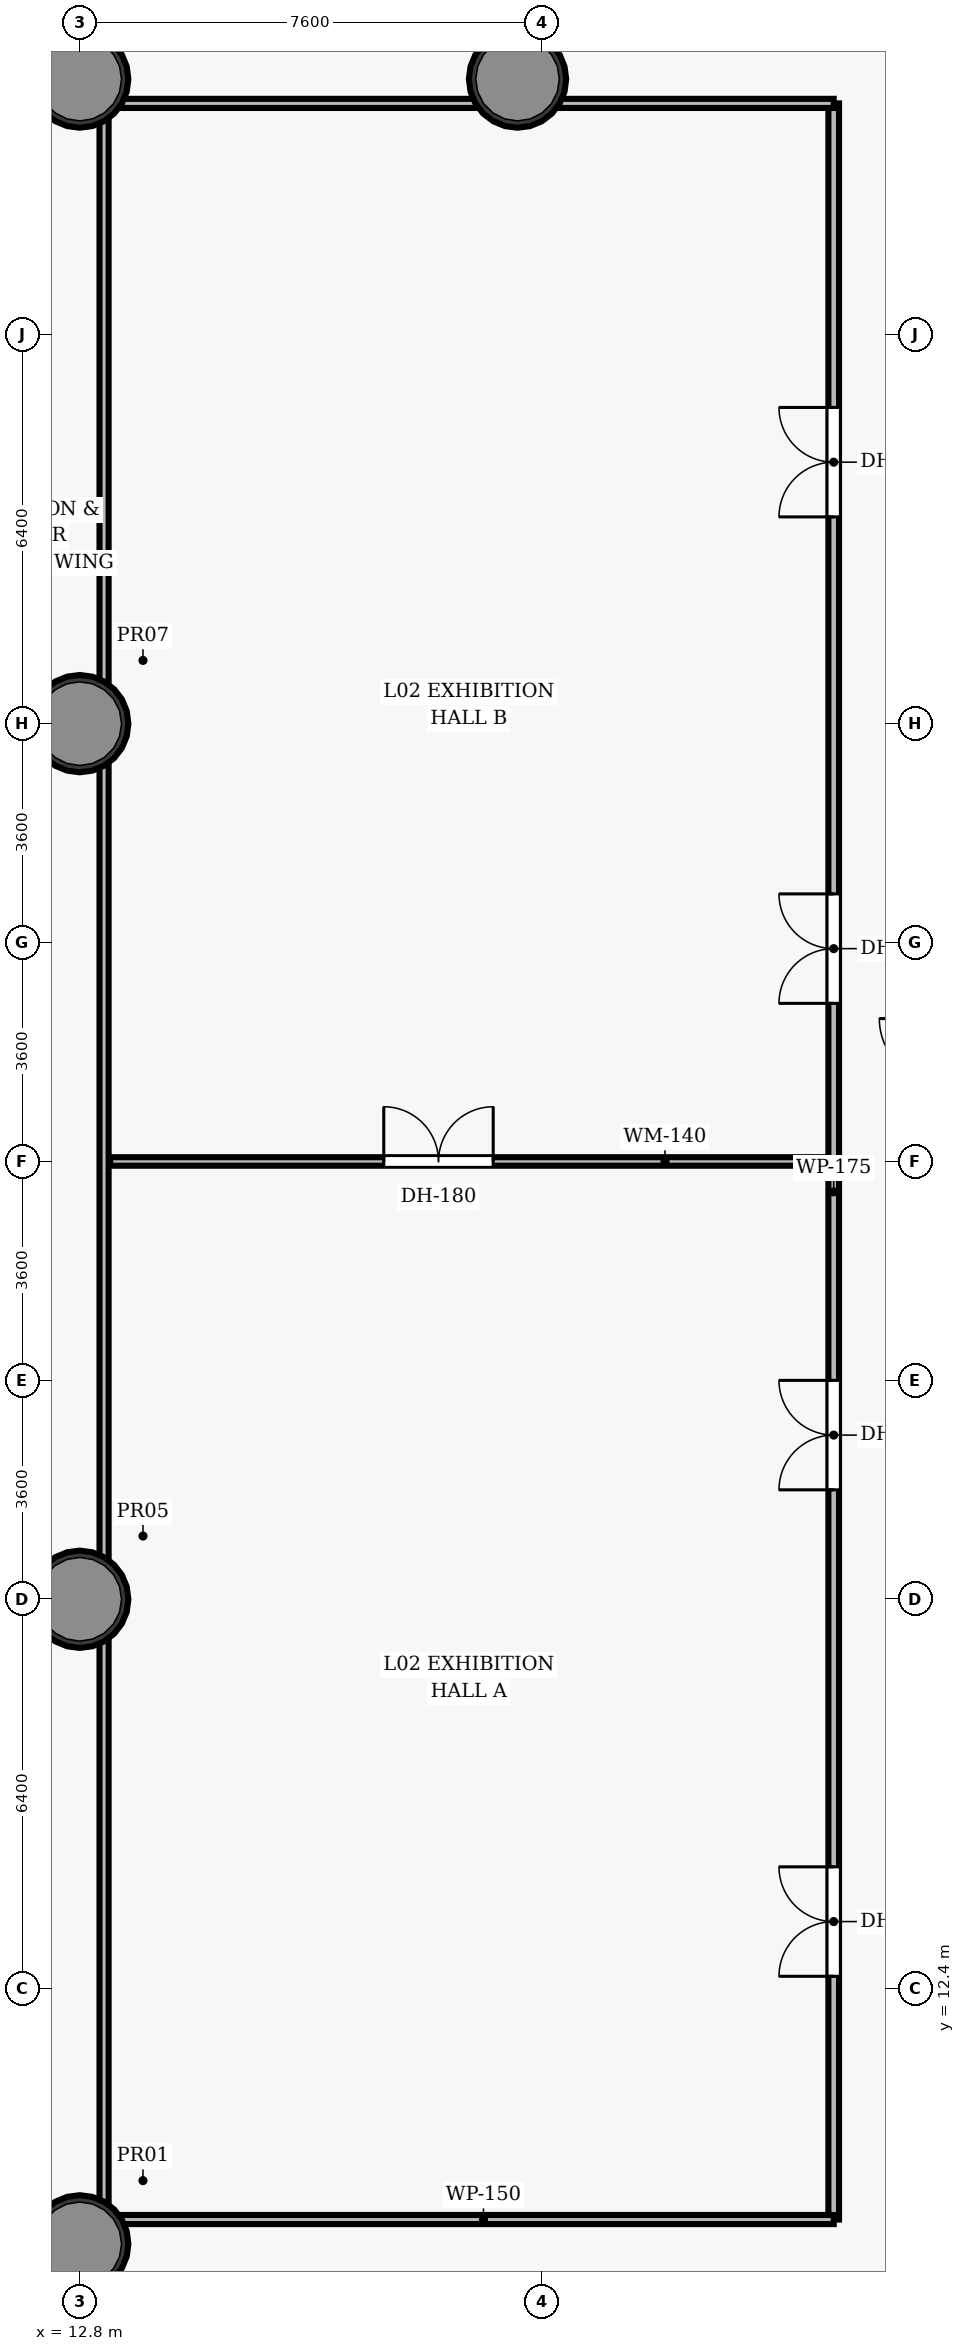
"""IFC4 building model, lengths in metres.
Left out: names, types, materials, properties, quantities, classifications, styles, units other than length and angle.
Written with IfcOpenShell. Run it as: python <this file> out.ifc"""

import sys

from ifc_helpers import new_model, si_unit, direction, frame, frame_2d, origin, origin_2d, place, context, subcontext, project, spatial, rectangle, hollow_circle, extrude, element, fill, save


model = new_model("IFC4")
c1 = context("Model", 3, precision=1e-05, world=origin(), true_north=direction((0.0, 1.0)))
c2 = subcontext(c1, "Body", "Model", "MODEL_VIEW")
j1 = project(units=[si_unit("LENGTHUNIT", "METRE"), si_unit("PLANEANGLEUNIT", "RADIAN")], contexts=[c1])
p1 = place(None, origin())
s1 = spatial("IfcSite", under=j1, at=p1, CompositionType="ELEMENT")
p2 = place(p1, origin())
s2 = spatial("IfcBuilding", under=s1, at=p2, CompositionType="ELEMENT")
p3 = place(p2, frame((0.0, 0.0, 12.0)))
s3 = spatial("IfcBuildingStorey", under=s2, at=p3, CompositionType="ELEMENT", Elevation=12.0)
for number, where, z_axis, x_axis in (
    (1, (12.8, 8.2, 0.0), (0.0, 0.0, 1.0), (1.0, 0.0, 0.0)),
    (2, (12.8, 18.8, 0.0), (0.0, 0.0, 1.0), (1.0, 0.0, 0.0)),
    (3, (12.8, 33.2, 0.0), (0.0, 0.0, 1.0), (1.0, 0.0, 0.0)),
    (4, (12.8, 43.8, 0.0), (0.0, 0.0, 1.0), (1.0, 0.0, 0.0)),
    (5, (20.0, 43.8, 0.0), (0.0, 0.0, 1.0), (1.0, 0.0, 0.0)),
):
    element("IfcColumn", number, at=place(p3, frame(where, z_axis=z_axis, x_axis=x_axis)), inside=s3, PredefinedType="COLUMN", context=c2, shape_type="SweptSolid", body=[
        extrude(hollow_circle(Radius=0.8, WallThickness=0.06, at=origin_2d()), origin(), (0.0, 0.0, 1.0), 6.6),
    ])
p4 = place(p3, frame((25.2, 8.6, 0.0), z_axis=(0.0, 0.0, 1.0), x_axis=(0.0, 1.0, 0.0)))
e6 = element("IfcWall", 6, at=p4, inside=s3, PredefinedType="PARTITIONING", context=c2, shape_type="SweptSolid", body=[
    extrude(rectangle(XDim=34.8, YDim=0.175, at=frame_2d((17.4, 0.0))), origin(), (0.0, 0.0, 1.0), 5.31),
])
p5 = place(p4, frame((4.0, 0.0, 0.0)))
e7 = element("IfcOpeningElement", 7, at=p5, cuts=e6, PredefinedType="OPENING", context=c2, shape_type="SweptSolid", body=[
    extrude(rectangle(XDim=1.8, YDim=2.35, at=frame_2d((0.9, 1.175))), frame((0.0, 0.097, 0.0), z_axis=(0.0, -1.0, 0.0), x_axis=(1.0, 0.0, 0.0)), (0.0, 0.0, 1.0), 0.195),
])
p6 = place(p4, frame((12.0, 0.0, 0.0)))
e8 = element("IfcOpeningElement", 8, at=p6, cuts=e6, PredefinedType="OPENING", context=c2, shape_type="SweptSolid", body=[
    extrude(rectangle(XDim=1.8, YDim=2.35, at=frame_2d((0.9, 1.175))), frame((0.0, 0.097, 0.0), z_axis=(0.0, -1.0, 0.0), x_axis=(1.0, 0.0, 0.0)), (0.0, 0.0, 1.0), 0.195),
])
p7 = place(p4, frame((20.0, 0.0, 0.0)))
e9 = element("IfcOpeningElement", 9, at=p7, cuts=e6, PredefinedType="OPENING", context=c2, shape_type="SweptSolid", body=[
    extrude(rectangle(XDim=1.8, YDim=2.35, at=frame_2d((0.9, 1.175))), frame((0.0, 0.097, 0.0), z_axis=(0.0, -1.0, 0.0), x_axis=(1.0, 0.0, 0.0)), (0.0, 0.0, 1.0), 0.195),
])
p8 = place(p4, frame((28.0, 0.0, 0.0)))
e10 = element("IfcOpeningElement", 10, at=p8, cuts=e6, PredefinedType="OPENING", context=c2, shape_type="SweptSolid", body=[
    extrude(rectangle(XDim=1.8, YDim=2.35, at=frame_2d((0.9, 1.175))), frame((0.0, 0.097, 0.0), z_axis=(0.0, -1.0, 0.0), x_axis=(1.0, 0.0, 0.0)), (0.0, 0.0, 1.0), 0.195),
])
for number, where, z_axis, x_axis in (
    (11, (13.2, 8.6, 0.0), (0.0, 0.0, 1.0), (1.0, 0.0, 0.0)),
    (12, (13.2, 43.4, 0.0), (0.0, 0.0, 1.0), (1.0, 0.0, 0.0)),
):
    element("IfcWall", number, at=place(p3, frame(where, z_axis=z_axis, x_axis=x_axis)), inside=s3, PredefinedType="PARTITIONING", context=c2, shape_type="SweptSolid", body=[
        extrude(rectangle(XDim=12.0, YDim=0.15, at=frame_2d((6.0, 0.0))), origin(), (0.0, 0.0, 1.0), 5.31),
    ])
p9 = place(p3, frame((13.2, 8.6, 0.0), z_axis=(0.0, 0.0, 1.0), x_axis=(0.0, 1.0, 0.0)))
e13 = element("IfcWall", 13, at=p9, inside=s3, PredefinedType="PARTITIONING", context=c2, shape_type="SweptSolid", body=[
    extrude(rectangle(XDim=34.8, YDim=0.15, at=frame_2d((17.4, 0.0))), origin(), (0.0, 0.0, 1.0), 5.31),
])
p10 = place(p3, frame((13.3, 26.0, 0.0), z_axis=(0.0, 0.0, 1.0), x_axis=(1.0, 0.0, 0.0)))
e14 = element("IfcWall", 14, at=p10, inside=s3, PredefinedType="MOVABLE", context=c2, shape_type="SweptSolid", body=[
    extrude(rectangle(XDim=11.8, YDim=0.14, at=frame_2d((5.9, 0.0))), origin(), (0.0, 0.0, 1.0), 5.31),
])
p11 = place(p10, frame((4.5, 0.0, 0.0)))
e15 = element("IfcOpeningElement", 15, at=p11, cuts=e14, PredefinedType="OPENING", context=c2, shape_type="SweptSolid", body=[
    extrude(rectangle(XDim=1.8, YDim=2.35, at=frame_2d((0.9, 1.175))), frame((0.0, 0.08, 0.0), z_axis=(0.0, -1.0, 0.0), x_axis=(1.0, 0.0, 0.0)), (0.0, 0.0, 1.0), 0.16),
])
p12 = place(p11, origin())
e16 = element("IfcDoor", 16, at=p12, inside=s3, OperationType="DOUBLE_DOOR_SINGLE_SWING", PredefinedType="DOOR", context=c2, shape_type="SweptSolid", body=[
    extrude(rectangle(XDim=1.8, YDim=2.35, at=frame_2d((0.9, 1.175))), frame((0.0, 0.025, 0.0), z_axis=(0.0, -1.0, 0.0), x_axis=(1.0, 0.0, 0.0)), (0.0, 0.0, 1.0), 0.05),
])
fill(e15, e16)
p13 = place(p5, origin())
e17 = element("IfcDoor", 17, at=p13, inside=s3, OperationType="DOUBLE_DOOR_SINGLE_SWING", PredefinedType="DOOR", context=c2, shape_type="SweptSolid", body=[
    extrude(rectangle(XDim=1.8, YDim=2.35, at=frame_2d((0.9, 1.175))), frame((0.0, 0.025, 0.0), z_axis=(0.0, -1.0, 0.0), x_axis=(1.0, 0.0, 0.0)), (0.0, 0.0, 1.0), 0.05),
])
fill(e7, e17)
p14 = place(p6, origin())
e18 = element("IfcDoor", 18, at=p14, inside=s3, OperationType="DOUBLE_DOOR_SINGLE_SWING", PredefinedType="DOOR", context=c2, shape_type="SweptSolid", body=[
    extrude(rectangle(XDim=1.8, YDim=2.35, at=frame_2d((0.9, 1.175))), frame((0.0, 0.025, 0.0), z_axis=(0.0, -1.0, 0.0), x_axis=(1.0, 0.0, 0.0)), (0.0, 0.0, 1.0), 0.05),
])
fill(e8, e18)
p15 = place(p7, origin())
e19 = element("IfcDoor", 19, at=p15, inside=s3, OperationType="DOUBLE_DOOR_SINGLE_SWING", PredefinedType="DOOR", context=c2, shape_type="SweptSolid", body=[
    extrude(rectangle(XDim=1.8, YDim=2.35, at=frame_2d((0.9, 1.175))), frame((0.0, 0.025, 0.0), z_axis=(0.0, -1.0, 0.0), x_axis=(1.0, 0.0, 0.0)), (0.0, 0.0, 1.0), 0.05),
])
fill(e9, e19)
p16 = place(p8, origin())
e20 = element("IfcDoor", 20, at=p16, inside=s3, OperationType="DOUBLE_DOOR_SINGLE_SWING", PredefinedType="DOOR", context=c2, shape_type="SweptSolid", body=[
    extrude(rectangle(XDim=1.8, YDim=2.35, at=frame_2d((0.9, 1.175))), frame((0.0, 0.025, 0.0), z_axis=(0.0, -1.0, 0.0), x_axis=(1.0, 0.0, 0.0)), (0.0, 0.0, 1.0), 0.05),
])
fill(e10, e20)
save(model, sys.argv[1])
